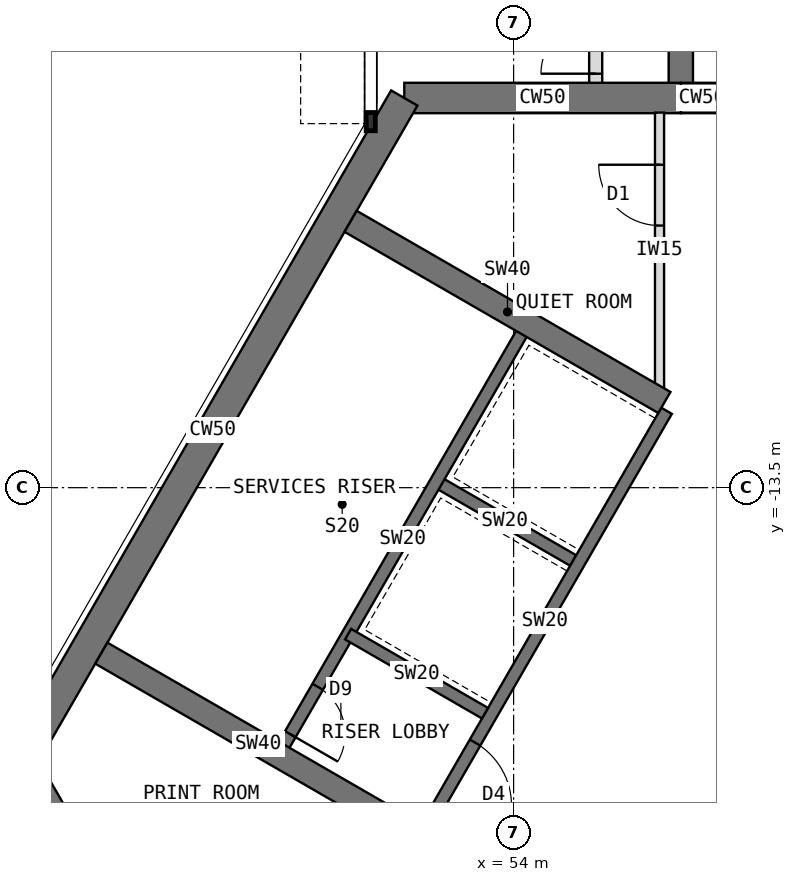
"""IFC4 building model, lengths in metres.
Left out: names, types, materials, properties, quantities, classifications, styles, units other than length and angle.
Written with IfcOpenShell. Run it as: python <this file> out.ifc"""

import sys

from ifc_helpers import new_model, si_unit, direction, frame, frame_2d, origin, place, context, subcontext, project, spatial, rectangle, extrude, element, fill, save


model = new_model("IFC4")
c1 = context("Model", 3, precision=1e-05, world=origin(), true_north=direction((0.0, 1.0)))
c2 = subcontext(c1, "Body", "Model", "MODEL_VIEW")
j1 = project(units=[si_unit("LENGTHUNIT", "METRE"), si_unit("PLANEANGLEUNIT", "RADIAN")], contexts=[c1])
p1 = place(None, origin())
s1 = spatial("IfcSite", under=j1, at=p1, CompositionType="ELEMENT")
p2 = place(p1, origin())
s2 = spatial("IfcBuilding", under=s1, at=p2, CompositionType="ELEMENT")
p3 = place(p2, frame((0.0, 0.0, 186.5)))
s3 = spatial("IfcBuildingStorey", under=s2, at=p3, CompositionType="ELEMENT", Elevation=186.5)
p4 = place(p3, frame((60.25, -7.092, 0.0), z_axis=(0.0, 0.0, 1.0), x_axis=(-1.0, 0.0, 0.0)))
e1 = element("IfcWall", 1, at=p4, inside=s3, PredefinedType="SHEAR", context=c2, shape_type="SweptSolid", body=[
    extrude(rectangle(XDim=3.5, YDim=0.5, at=frame_2d((1.75, 0.0))), origin(), (0.0, 0.0, 1.0), 4.0),
])
p5 = place(p4, frame((0.85, 0.0, 0.0)))
e2 = element("IfcOpeningElement", 2, at=p5, cuts=e1, PredefinedType="OPENING", context=c2, shape_type="SweptSolid", body=[
    extrude(rectangle(XDim=1.8, YDim=2.1, at=frame_2d((0.9, 1.05))), frame((0.0, 0.26, 0.0), z_axis=(0.0, -1.0, 0.0), x_axis=(1.0, 0.0, 0.0)), (0.0, 0.0, 1.0), 0.52),
])
p6 = place(p3, frame((56.75, -7.092, 0.0), z_axis=(0.0, 0.0, 1.0), x_axis=(-1.0, 0.0, 0.0)))
e3 = element("IfcWall", 3, at=p6, inside=s3, PredefinedType="SHEAR", context=c2, shape_type="SweptSolid", body=[
    extrude(rectangle(XDim=4.548, YDim=0.5, at=frame_2d((2.274, 0.0))), origin(), (0.0, 0.0, 1.0), 4.0),
])
p7 = place(p3, frame((52.202, -7.092, 0.0), z_axis=(0.0, 0.0, 1.0), x_axis=(-0.500005998175, -0.866021940709, 0.0)))
e4 = element("IfcWall", 4, at=p7, inside=s3, PredefinedType="SHEAR", context=c2, shape_type="SweptSolid", body=[
    extrude(rectangle(XDim=12.596, YDim=0.5, at=frame_2d((6.298, 0.0))), origin(), (0.0, 0.0, 1.0), 4.0),
])
p8 = place(p3, frame((45.904, -18.0, 0.0), z_axis=(0.0, 0.0, 1.0), x_axis=(0.500024481964, -0.866011268655, 0.0)))
e5 = element("IfcWall", 5, at=p8, inside=s3, PredefinedType="SHEAR", context=c2, shape_type="SweptSolid", body=[
    extrude(rectangle(XDim=4.548, YDim=0.5, at=frame_2d((2.274, 0.0))), origin(), (0.0, 0.0, 1.0), 4.0),
])
p9 = place(p3, frame((56.75, -7.092, 0.0), z_axis=(0.0, 0.0, 1.0), x_axis=(0.0, 1.0, 0.0)))
e6 = element("IfcWall", 6, at=p9, inside=s3, PredefinedType="SHEAR", context=c2, shape_type="SweptSolid", body=[
    extrude(rectangle(XDim=2.592, YDim=0.4, at=frame_2d((1.296, 0.0))), origin(), (0.0, 0.0, 1.0), 4.0),
])
p10 = place(p3, frame((56.516, -12.236, 0.0), z_axis=(0.0, 0.0, 1.0), x_axis=(-0.49999894854, -0.866026010844, 0.0)))
e7 = element("IfcWall", 7, at=p10, inside=s3, PredefinedType="SHEAR", context=c2, shape_type="SweptSolid", body=[
    extrude(rectangle(XDim=8.0, YDim=0.2, at=frame_2d((4.0, 0.0))), origin(), (0.0, 0.0, 1.0), 4.0),
])
p11 = place(p10, frame((6.3, 0.0, 0.0)))
e8 = element("IfcOpeningElement", 8, at=p11, cuts=e7, PredefinedType="OPENING", context=c2, shape_type="SweptSolid", body=[
    extrude(rectangle(XDim=1.2, YDim=2.1, at=frame_2d((0.6, 1.05))), frame((0.0, 0.11, 0.0), z_axis=(0.0, -1.0, 0.0), x_axis=(1.0, 0.0, 0.0)), (0.0, 0.0, 1.0), 0.22),
])
for number, where, z_axis, x_axis in (
    (9, (54.98, -14.697, 0.0), (0.0, 0.0, 1.0), (-0.866, 0.5, 0.0)),
    (10, (53.53, -17.209, 0.0), (0.0, 0.0, 1.0), (-0.866, 0.5, 0.0)),
):
    element("IfcWall", number, at=place(p3, frame(where, z_axis=z_axis, x_axis=x_axis)), inside=s3, PredefinedType="SHEAR", context=c2, shape_type="SweptSolid", body=[
        extrude(rectangle(XDim=2.6, YDim=0.2, at=frame_2d((1.3, 0.0))), origin(), (0.0, 0.0, 1.0), 4.0),
    ])
p12 = place(p3, frame((54.178, -10.886, 0.0), z_axis=(0.0, 0.0, 1.0), x_axis=(-0.49999894854, -0.866026010844, 0.0)))
e11 = element("IfcWall", 11, at=p12, inside=s3, PredefinedType="SHEAR", context=c2, shape_type="SweptSolid", body=[
    extrude(rectangle(XDim=8.0, YDim=0.2, at=frame_2d((4.0, 0.0))), origin(), (0.0, 0.0, 1.0), 4.0),
])
p13 = place(p12, frame((6.8, 0.0, 0.0)))
e12 = element("IfcOpeningElement", 12, at=p13, cuts=e11, PredefinedType="OPENING", context=c2, shape_type="SweptSolid", body=[
    extrude(rectangle(XDim=0.9, YDim=2.1, at=frame_2d((0.45, 1.05))), frame((0.0, 0.11, 0.0), z_axis=(0.0, -1.0, 0.0), x_axis=(1.0, 0.0, 0.0)), (0.0, 0.0, 1.0), 0.22),
])
p14 = place(p3, frame((52.38, -19.201, 0.0), z_axis=(0.0, 0.0, 1.0), x_axis=(-0.866012946976, 0.500021575205, 0.0)))
e13 = element("IfcWall", 13, at=p14, inside=s3, PredefinedType="SHEAR", context=c2, shape_type="SweptSolid", body=[
    extrude(rectangle(XDim=5.958, YDim=0.4, at=frame_2d((2.979, 0.0))), origin(), (0.0, 0.0, 1.0), 4.0),
])
p15 = place(p3, frame((56.48, -12.099, 0.0), z_axis=(0.0, 0.0, 1.0), x_axis=(-0.86602319114, 0.500003832394, 0.0)))
e14 = element("IfcWall", 14, at=p15, inside=s3, PredefinedType="SHEAR", context=c2, shape_type="SweptSolid", body=[
    extrude(rectangle(XDim=5.958, YDim=0.4, at=frame_2d((2.979, 0.0))), origin(), (0.0, 0.0, 1.0), 4.0),
])
p16 = place(p3, frame((55.35, -6.842, 0.0), z_axis=(0.0, 0.0, 1.0), x_axis=(0.0, 1.0, 0.0)))
e15 = element("IfcWall", 15, at=p16, inside=s3, PredefinedType="PARTITIONING", context=c2, shape_type="SweptSolid", body=[
    extrude(rectangle(XDim=2.4, YDim=0.215, at=frame_2d((1.2, 0.0))), origin(), (0.0, 0.0, 1.0), 3.8),
])
p17 = place(p16, frame((0.15, 0.0, 0.0)))
e16 = element("IfcOpeningElement", 16, at=p17, cuts=e15, PredefinedType="OPENING", context=c2, shape_type="SweptSolid", body=[
    extrude(rectangle(XDim=0.9, YDim=2.1, at=frame_2d((0.45, 1.05))), frame((0.0, 0.117, 0.0), z_axis=(0.0, -1.0, 0.0), x_axis=(1.0, 0.0, 0.0)), (0.0, 0.0, 1.0), 0.235),
])
p18 = place(p3, frame((56.4, -11.857, 0.0), z_axis=(0.0, 0.0, 1.0), x_axis=(0.0, 1.0, 0.0)))
e17 = element("IfcWall", 17, at=p18, inside=s3, PredefinedType="PARTITIONING", context=c2, shape_type="SweptSolid", body=[
    extrude(rectangle(XDim=4.526, YDim=0.15, at=frame_2d((2.263, 0.0))), origin(), (0.0, 0.0, 1.0), 3.8),
])
p19 = place(p18, frame((2.668, 0.0, 0.0)))
e18 = element("IfcOpeningElement", 18, at=p19, cuts=e17, PredefinedType="OPENING", context=c2, shape_type="SweptSolid", body=[
    extrude(rectangle(XDim=1.0, YDim=2.1, at=frame_2d((0.5, 1.05))), frame((0.0, 0.085, 0.0), z_axis=(0.0, -1.0, 0.0), x_axis=(1.0, 0.0, 0.0)), (0.0, 0.0, 1.0), 0.17),
])
p20 = place(p11, origin())
e19 = element("IfcDoor", 19, at=p20, inside=s3, OperationType="SINGLE_SWING_RIGHT", PredefinedType="DOOR", context=c2, shape_type="SweptSolid", body=[
    extrude(rectangle(XDim=1.2, YDim=2.1, at=frame_2d((0.6, 1.05))), frame((0.0, 0.025, 0.0), z_axis=(0.0, -1.0, 0.0), x_axis=(1.0, 0.0, 0.0)), (0.0, 0.0, 1.0), 0.05),
])
fill(e8, e19)
p21 = place(p13, origin())
e20 = element("IfcDoor", 20, at=p21, inside=s3, OperationType="SINGLE_SWING_RIGHT", PredefinedType="DOOR", context=c2, shape_type="SweptSolid", body=[
    extrude(rectangle(XDim=0.9, YDim=2.1, at=frame_2d((0.45, 1.05))), frame((0.0, 0.025, 0.0), z_axis=(0.0, -1.0, 0.0), x_axis=(1.0, 0.0, 0.0)), (0.0, 0.0, 1.0), 0.05),
])
fill(e12, e20)
p22 = place(p17, origin())
e21 = element("IfcDoor", 21, at=p22, inside=s3, OperationType="SINGLE_SWING_LEFT", PredefinedType="DOOR", context=c2, shape_type="SweptSolid", body=[
    extrude(rectangle(XDim=0.9, YDim=2.1, at=frame_2d((0.45, 1.05))), frame((0.0, 0.025, 0.0), z_axis=(0.0, -1.0, 0.0), x_axis=(1.0, 0.0, 0.0)), (0.0, 0.0, 1.0), 0.05),
])
fill(e16, e21)
p23 = place(p19, origin())
e22 = element("IfcDoor", 22, at=p23, inside=s3, OperationType="SINGLE_SWING_RIGHT", PredefinedType="DOOR", context=c2, shape_type="SweptSolid", body=[
    extrude(rectangle(XDim=1.0, YDim=2.1, at=frame_2d((0.5, 1.05))), frame((0.0, 0.025, 0.0), z_axis=(0.0, -1.0, 0.0), x_axis=(1.0, 0.0, 0.0)), (0.0, 0.0, 1.0), 0.05),
])
fill(e18, e22)
save(model, sys.argv[1])
